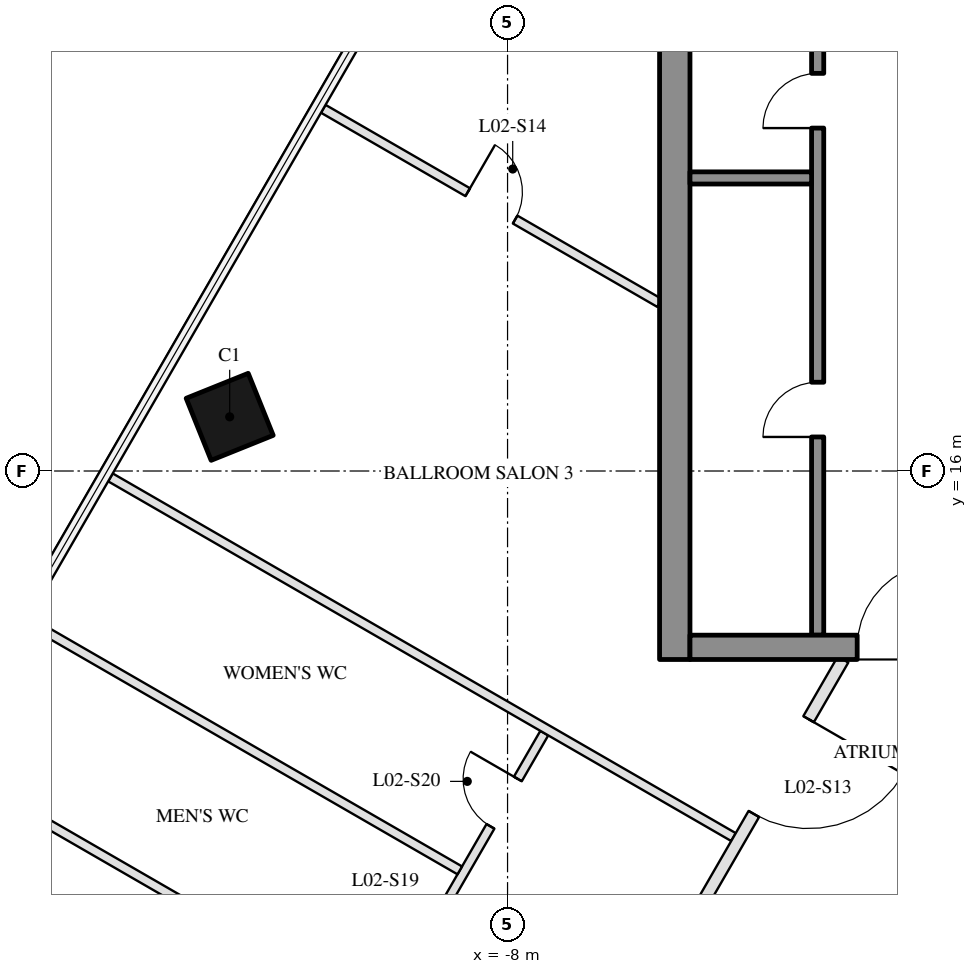
"""IFC4 building model, lengths in metres.
Left out: names, types, materials, properties, quantities, classifications, styles, units other than length and angle.
Written with IfcOpenShell. Run it as: python <this file> out.ifc"""

import sys

from ifc_helpers import new_model, si_unit, direction, frame, frame_2d, origin, origin_2d, place, context, subcontext, project, spatial, rectangle, hollow_rectangle, extrude, boolean, halfspace, element, fill, save


model = new_model("IFC4")
c1 = context("Model", 3, precision=1e-05, world=origin(), true_north=direction((0.0, 1.0)))
c2 = subcontext(c1, "Body", "Model", "MODEL_VIEW")
j1 = project(units=[si_unit("LENGTHUNIT", "METRE"), si_unit("PLANEANGLEUNIT", "RADIAN")], contexts=[c1])
p1 = place(None, origin())
s1 = spatial("IfcSite", under=j1, at=p1, CompositionType="ELEMENT")
p2 = place(p1, origin())
s2 = spatial("IfcBuilding", under=s1, at=p2, CompositionType="ELEMENT")
p3 = place(p2, frame((0.0, 0.0, 15.5)))
s3 = spatial("IfcBuildingStorey", under=s2, at=p3, CompositionType="ELEMENT", Elevation=15.5)
p4 = place(p3, frame((-8.398, 24.117, 0.0), z_axis=(0.037755622173, -0.097545474007, 0.994514652227), x_axis=(0.501388733387, 0.862732820809, 0.065585195976)))
e1 = element("IfcColumn", 1, at=p4, inside=s3, PredefinedType="COLUMN", context=c2, shape_type="SweptSolid", body=[
    boolean("DIFFERENCE", boolean("DIFFERENCE", extrude(hollow_rectangle(XDim=1.1, YDim=1.1, WallThickness=0.05, at=origin_2d()), origin(), (0.0, 0.0, 1.0), 8.044), halfspace(frame((0.0, 0.0, 0.018), z_axis=(0.0, 0.0, 1.0), x_axis=(1.0, 0.0, 0.0)), True)), halfspace(frame((0.0, 0.0, 8.027), z_axis=(0.0, 0.0, 1.0), x_axis=(1.0, 0.0, 0.0)), False)),
])
p5 = place(p3, frame((-12.57, 16.891, 0.0), z_axis=(0.054232459867, -0.069219344797, 0.996126258364), x_axis=(0.500873253526, 0.864897735693, 0.032831245724)))
e2 = element("IfcColumn", 2, at=p5, inside=s3, PredefinedType="COLUMN", context=c2, shape_type="SweptSolid", body=[
    boolean("DIFFERENCE", boolean("DIFFERENCE", extrude(hollow_rectangle(XDim=1.1, YDim=1.1, WallThickness=0.05, at=origin_2d()), origin(), (0.0, 0.0, 1.0), 8.031), halfspace(frame((0.0, 0.0, 0.016), z_axis=(0.0, 0.0, 1.0), x_axis=(1.0, 0.0, 0.0)), True)), halfspace(frame((0.0, 0.0, 8.017), z_axis=(0.0, 0.0, 1.0), x_axis=(1.0, 0.0, 0.0)), False)),
])
p6 = place(p3, frame((-16.741, 9.666, 0.0), z_axis=(0.070716365811, -0.040848206144, 0.996659731133), x_axis=(-0.500184519903, -0.865918844956, 0.0)))
e3 = element("IfcColumn", 3, at=p6, inside=s3, PredefinedType="COLUMN", context=c2, shape_type="SweptSolid", body=[
    boolean("DIFFERENCE", boolean("DIFFERENCE", extrude(hollow_rectangle(XDim=1.1, YDim=1.1, WallThickness=0.05, at=origin_2d()), origin(), (0.0, 0.0, 1.0), 8.027), halfspace(frame((0.0, 0.0, 0.015), z_axis=(0.0, 0.0, 1.0), x_axis=(1.0, 0.0, 0.0)), True)), halfspace(frame((0.0, 0.0, 8.013), z_axis=(0.0, 0.0, 1.0), x_axis=(1.0, 0.0, 0.0)), False)),
])
p7 = place(p3, frame((-5.25, 12.9, 0.0), z_axis=(0.0, 0.0, 1.0), x_axis=(0.0, 1.0, 0.0)))
e4 = element("IfcWall", 4, at=p7, inside=s3, PredefinedType="SHEAR", context=c2, shape_type="SweptSolid", body=[
    extrude(rectangle(XDim=15.6, YDim=0.5, at=frame_2d((7.8, 0.0))), origin(), (0.0, 0.0, 1.0), 7.7),
])
p8 = place(p3, frame((-2.9, 13.3, 0.0), z_axis=(0.0, 0.0, 1.0), x_axis=(0.0, 1.0, 0.0)))
e5 = element("IfcWall", 5, at=p8, inside=s3, PredefinedType="SHEAR", context=c2, shape_type="SweptSolid", body=[
    extrude(rectangle(XDim=12.6, YDim=0.2, at=frame_2d((6.3, 0.0))), origin(), (0.0, 0.0, 1.0), 7.7),
])
p9 = place(p8, frame((3.26, 0.0, 0.0)))
e6 = element("IfcOpeningElement", 6, at=p9, cuts=e5, PredefinedType="OPENING", context=c2, shape_type="SweptSolid", body=[
    extrude(rectangle(XDim=0.9, YDim=2.1, at=frame_2d((0.45, 1.05))), frame((0.0, 0.11, 0.0), z_axis=(0.0, -1.0, 0.0), x_axis=(1.0, 0.0, 0.0)), (0.0, 0.0, 1.0), 0.22),
])
p10 = place(p8, frame((8.34, 0.0, 0.0)))
e7 = element("IfcOpeningElement", 7, at=p10, cuts=e5, PredefinedType="OPENING", context=c2, shape_type="SweptSolid", body=[
    extrude(rectangle(XDim=0.9, YDim=2.1, at=frame_2d((0.45, 1.05))), frame((0.0, 0.11, 0.0), z_axis=(0.0, -1.0, 0.0), x_axis=(1.0, 0.0, 0.0)), (0.0, 0.0, 1.0), 0.22),
])
p11 = place(p8, frame((10.51, 0.0, 0.0)))
e8 = element("IfcOpeningElement", 8, at=p11, cuts=e5, PredefinedType="OPENING", context=c2, shape_type="SweptSolid", body=[
    extrude(rectangle(XDim=0.9, YDim=2.1, at=frame_2d((0.45, 1.05))), frame((0.0, 0.11, 0.0), z_axis=(0.0, -1.0, 0.0), x_axis=(1.0, 0.0, 0.0)), (0.0, 0.0, 1.0), 0.22),
])
p12 = place(p3, frame((-3.0, 20.82, 0.0), z_axis=(0.0, 0.0, 1.0), x_axis=(-1.0, 0.0, 0.0)))
e9 = element("IfcWall", 9, at=p12, inside=s3, PredefinedType="SHEAR", context=c2, shape_type="SweptSolid", body=[
    extrude(rectangle(XDim=2.0, YDim=0.2, at=frame_2d((1.0, 0.0))), origin(), (0.0, 0.0, 1.0), 7.7),
])
p13 = place(p3, frame((2.45, 13.1, 0.0), z_axis=(0.0, 0.0, 1.0), x_axis=(-1.0, 0.0, 0.0)))
e10 = element("IfcWall", 10, at=p13, inside=s3, PredefinedType="SHEAR", context=c2, shape_type="SweptSolid", body=[
    extrude(rectangle(XDim=7.45, YDim=0.4, at=frame_2d((3.725, 0.0))), origin(), (0.0, 0.0, 1.0), 7.7),
])
p14 = place(p13, frame((1.0, 0.0, 0.0)))
e11 = element("IfcOpeningElement", 11, at=p14, cuts=e10, PredefinedType="OPENING", context=c2, shape_type="SweptSolid", body=[
    extrude(rectangle(XDim=1.1, YDim=2.1, at=frame_2d((0.55, 1.05))), frame((0.0, 0.21, 0.0), z_axis=(0.0, -1.0, 0.0), x_axis=(1.0, 0.0, 0.0)), (0.0, 0.0, 1.0), 0.42),
])
p15 = place(p13, frame((3.3, 0.0, 0.0)))
e12 = element("IfcOpeningElement", 12, at=p15, cuts=e10, PredefinedType="OPENING", context=c2, shape_type="SweptSolid", body=[
    extrude(rectangle(XDim=1.4, YDim=2.1, at=frame_2d((0.7, 1.05))), frame((0.0, 0.21, 0.0), z_axis=(0.0, -1.0, 0.0), x_axis=(1.0, 0.0, 0.0)), (0.0, 0.0, 1.0), 0.42),
])
p16 = place(p3, frame((-7.396, 11.689, 0.0), z_axis=(0.0, 0.0, 1.0), x_axis=(-0.500005920892, -0.866021985329, 0.0)))
e13 = element("IfcWall", 13, at=p16, inside=s3, PredefinedType="PARTITIONING", context=c2, shape_type="SweptSolid", body=[
    extrude(rectangle(XDim=8.325, YDim=0.15, at=frame_2d((4.163, 0.0))), origin(), (0.0, 0.0, 1.0), 6.91),
])
p17 = place(p16, frame((6.354, 0.0, 0.0)))
e14 = element("IfcOpeningElement", 14, at=p17, cuts=e13, PredefinedType="OPENING", context=c2, shape_type="SweptSolid", body=[
    extrude(rectangle(XDim=1.0, YDim=2.1, at=frame_2d((0.5, 1.05))), frame((0.0, 0.085, 0.0), z_axis=(0.0, -1.0, 0.0), x_axis=(1.0, 0.0, 0.0)), (0.0, 0.0, 1.0), 0.17),
])
p18 = place(p16, frame((3.562, 0.0, 0.0)))
e15 = element("IfcOpeningElement", 15, at=p18, cuts=e13, PredefinedType="OPENING", context=c2, shape_type="SweptSolid", body=[
    extrude(rectangle(XDim=0.9, YDim=2.1, at=frame_2d((0.45, 1.05))), frame((0.0, 0.085, 0.0), z_axis=(0.0, -1.0, 0.0), x_axis=(1.0, 0.0, 0.0)), (0.0, 0.0, 1.0), 0.17),
])
p19 = place(p16, frame((0.871, 0.0, 0.0)))
e16 = element("IfcOpeningElement", 16, at=p19, cuts=e13, PredefinedType="OPENING", context=c2, shape_type="SweptSolid", body=[
    extrude(rectangle(XDim=0.9, YDim=2.1, at=frame_2d((0.45, 1.05))), frame((0.0, 0.085, 0.0), z_axis=(0.0, -1.0, 0.0), x_axis=(1.0, 0.0, 0.0)), (0.0, 0.0, 1.0), 0.17),
])
p20 = place(p3, frame((-11.031, 21.957, 0.0), z_axis=(0.0, 0.0, 1.0), x_axis=(0.866030253878, -0.499991599297, 0.0)))
e17 = element("IfcWall", 17, at=p20, inside=s3, PredefinedType="PARTITIONING", context=c2, shape_type="SweptSolid", body=[
    extrude(rectangle(XDim=6.386, YDim=0.15, at=frame_2d((3.193, 0.0))), origin(), (0.0, 0.0, 1.0), 7.1),
])
p21 = place(p20, frame((2.743, 0.0, 0.0)))
e18 = element("IfcOpeningElement", 18, at=p21, cuts=e17, PredefinedType="OPENING", context=c2, shape_type="SweptSolid", body=[
    extrude(rectangle(XDim=0.9, YDim=2.1, at=frame_2d((0.45, 1.05))), frame((0.0, 0.085, 0.0), z_axis=(0.0, -1.0, 0.0), x_axis=(1.0, 0.0, 0.0)), (0.0, 0.0, 1.0), 0.17),
])
p22 = place(p3, frame((-14.531, 15.895, 0.0), z_axis=(0.0, 0.0, 1.0), x_axis=(0.866032672044, -0.499987410794, 0.0)))
e19 = element("IfcWall", 19, at=p22, inside=s3, PredefinedType="PARTITIONING", context=c2, shape_type="SweptSolid", body=[
    extrude(rectangle(XDim=11.831, YDim=0.15, at=frame_2d((5.916, 0.0))), origin(), (0.0, 0.0, 1.0), 7.1),
])
for number, where, z_axis, x_axis in (
    (20, (-15.893, 13.535, 0.0), (0.0, 0.0, 1.0), (0.866, -0.5, 0.0)),
    (21, (-17.256, 11.175, 0.0), (0.0, 0.0, 1.0), (0.866, -0.5, 0.0)),
):
    element("IfcWall", number, at=place(p3, frame(where, z_axis=z_axis, x_axis=x_axis)), inside=s3, PredefinedType="PARTITIONING", context=c2, shape_type="SweptSolid", body=[
        extrude(rectangle(XDim=8.207, YDim=0.15, at=frame_2d((4.104, 0.0))), origin(), (0.0, 0.0, 1.0), 7.1),
    ])
p23 = place(p3, frame((-2.482, 12.9, 0.0), z_axis=(0.0, 0.0, 1.0), x_axis=(-0.50000478328, -0.866022642139, 0.0)))
e22 = element("IfcWall", 22, at=p23, inside=s3, PredefinedType="PARTITIONING", context=c2, shape_type="SweptSolid", body=[
    extrude(rectangle(XDim=19.861, YDim=0.2, at=frame_2d((9.931, 0.0))), origin(), (0.0, 0.0, 1.0), 6.91),
])
p24 = place(p23, frame((13.23, 0.0, 0.0)))
e23 = element("IfcOpeningElement", 23, at=p24, cuts=e22, PredefinedType="OPENING", context=c2, shape_type="SweptSolid", body=[
    extrude(rectangle(XDim=1.8, YDim=2.1, at=frame_2d((0.9, 1.05))), frame((0.0, 0.11, 0.0), z_axis=(0.0, -1.0, 0.0), x_axis=(1.0, 0.0, 0.0)), (0.0, 0.0, 1.0), 0.22),
])
p25 = place(p23, frame((1.134, 0.0, 0.0)))
e24 = element("IfcOpeningElement", 24, at=p25, cuts=e22, PredefinedType="OPENING", context=c2, shape_type="SweptSolid", body=[
    extrude(rectangle(XDim=1.8, YDim=2.4, at=frame_2d((0.9, 1.2))), frame((0.0, 0.11, 0.0), z_axis=(0.0, -1.0, 0.0), x_axis=(1.0, 0.0, 0.0)), (0.0, 0.0, 1.0), 0.22),
])
p26 = place(p23, frame((17.59, 0.0, 0.0)))
e25 = element("IfcOpeningElement", 25, at=p26, cuts=e22, PredefinedType="OPENING", context=c2, shape_type="SweptSolid", body=[
    extrude(rectangle(XDim=1.0, YDim=2.1, at=frame_2d((0.5, 1.05))), frame((0.0, 0.11, 0.0), z_axis=(0.0, -1.0, 0.0), x_axis=(1.0, 0.0, 0.0)), (0.0, 0.0, 1.0), 0.22),
])
p27 = place(p23, frame((7.168, 0.0, 0.0)))
e26 = element("IfcOpeningElement", 26, at=p27, cuts=e22, PredefinedType="OPENING", context=c2, shape_type="SweptSolid", body=[
    extrude(rectangle(XDim=1.0, YDim=2.1, at=frame_2d((0.5, 1.05))), frame((0.0, 0.11, 0.0), z_axis=(0.0, -1.0, 0.0), x_axis=(1.0, 0.0, 0.0)), (0.0, 0.0, 1.0), 0.22),
])
p28 = place(p9, origin())
e27 = element("IfcDoor", 27, at=p28, inside=s3, OperationType="SINGLE_SWING_LEFT", PredefinedType="DOOR", context=c2, shape_type="SweptSolid", body=[
    extrude(rectangle(XDim=0.9, YDim=2.1, at=frame_2d((0.45, 1.05))), frame((0.0, 0.025, 0.0), z_axis=(0.0, -1.0, 0.0), x_axis=(1.0, 0.0, 0.0)), (0.0, 0.0, 1.0), 0.05),
])
fill(e6, e27)
p29 = place(p10, origin())
e28 = element("IfcDoor", 28, at=p29, inside=s3, OperationType="SINGLE_SWING_LEFT", PredefinedType="DOOR", context=c2, shape_type="SweptSolid", body=[
    extrude(rectangle(XDim=0.9, YDim=2.1, at=frame_2d((0.45, 1.05))), frame((0.0, 0.025, 0.0), z_axis=(0.0, -1.0, 0.0), x_axis=(1.0, 0.0, 0.0)), (0.0, 0.0, 1.0), 0.05),
])
fill(e7, e28)
p30 = place(p15, frame((1.4, 0.0, 0.0), z_axis=(0.0, 0.0, 1.0), x_axis=(-1.0, 0.0, 0.0)))
e29 = element("IfcDoor", 29, at=p30, inside=s3, OperationType="DOUBLE_DOOR_SINGLE_SWING", PredefinedType="DOOR", context=c2, shape_type="SweptSolid", body=[
    extrude(rectangle(XDim=1.4, YDim=2.1, at=frame_2d((0.7, 1.05))), frame((0.0, 0.025, 0.0), z_axis=(0.0, -1.0, 0.0), x_axis=(1.0, 0.0, 0.0)), (0.0, 0.0, 1.0), 0.05),
])
fill(e12, e29)
p31 = place(p25, origin())
e30 = element("IfcDoor", 30, at=p31, inside=s3, OperationType="DOUBLE_DOOR_SINGLE_SWING", PredefinedType="DOOR", context=c2, shape_type="SweptSolid", body=[
    extrude(rectangle(XDim=1.8, YDim=2.4, at=frame_2d((0.9, 1.2))), frame((0.0, 0.025, 0.0), z_axis=(0.0, -1.0, 0.0), x_axis=(1.0, 0.0, 0.0)), (0.0, 0.0, 1.0), 0.05),
])
fill(e24, e30)
p32 = place(p21, origin())
e31 = element("IfcDoor", 31, at=p32, inside=s3, OperationType="SINGLE_SWING_LEFT", PredefinedType="DOOR", context=c2, shape_type="SweptSolid", body=[
    extrude(rectangle(XDim=0.9, YDim=2.1, at=frame_2d((0.45, 1.05))), frame((0.0, 0.025, 0.0), z_axis=(0.0, -1.0, 0.0), x_axis=(1.0, 0.0, 0.0)), (0.0, 0.0, 1.0), 0.05),
])
fill(e18, e31)
p33 = place(p19, frame((0.9, 0.0, 0.0), z_axis=(0.0, 0.0, 1.0), x_axis=(-1.0, 0.0, 0.0)))
e32 = element("IfcDoor", 32, at=p33, inside=s3, OperationType="SINGLE_SWING_RIGHT", PredefinedType="DOOR", context=c2, shape_type="SweptSolid", body=[
    extrude(rectangle(XDim=0.9, YDim=2.1, at=frame_2d((0.45, 1.05))), frame((0.0, 0.025, 0.0), z_axis=(0.0, -1.0, 0.0), x_axis=(1.0, 0.0, 0.0)), (0.0, 0.0, 1.0), 0.05),
])
fill(e16, e32)
save(model, sys.argv[1])
